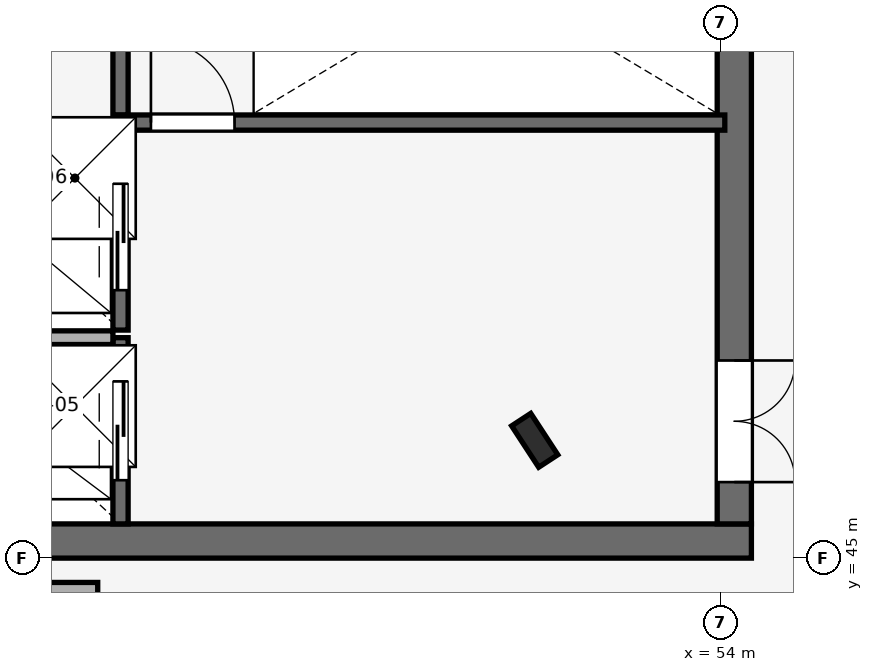
"""IFC4 building model, lengths in metres.
Left out: names, types, materials, properties, quantities, classifications, styles, units other than length and angle.
Written with IfcOpenShell. Run it as: python <this file> out.ifc"""

import sys

from ifc_helpers import new_model, si_unit, direction, frame, frame_2d, origin, origin_2d, place, context, subcontext, project, spatial, rectangle, i_section, extrude, element, fill, save


model = new_model("IFC4")
c1 = context("Model", 3, precision=1e-05, world=origin(), true_north=direction((0.0, 1.0)))
c2 = subcontext(c1, "Body", "Model", "MODEL_VIEW")
j1 = project(units=[si_unit("LENGTHUNIT", "METRE"), si_unit("PLANEANGLEUNIT", "RADIAN")], contexts=[c1])
p1 = place(None, origin())
s1 = spatial("IfcSite", under=j1, at=p1, CompositionType="ELEMENT")
p2 = place(p1, origin())
s2 = spatial("IfcBuilding", under=s1, at=p2, CompositionType="ELEMENT")
p3 = place(p2, frame((0.0, 0.0, 24.0)))
s3 = spatial("IfcBuildingStorey", under=s2, at=p3, CompositionType="ELEMENT", Elevation=24.0)
p4 = place(p3, frame((51.549, 46.55, 0.0), z_axis=(0.0, 0.0, 1.0), x_axis=(-0.836955398099, -0.547271104292, 0.0)))
e1 = element("IfcColumn", 1, at=p4, inside=s3, PredefinedType="COLUMN", context=c2, shape_type="SweptSolid", body=[
    extrude(i_section(OverallWidth=0.3, OverallDepth=0.65, WebThickness=0.016, FlangeThickness=0.031, FilletRadius=0.027, at=origin_2d()), origin(), (0.0, 0.0, 1.0), 3.4),
])
p5 = place(p3, frame((43.0, 45.225, 0.0), z_axis=(0.0, 0.0, 1.0), x_axis=(1.0, 0.0, 0.0)))
e2 = element("IfcWall", 2, at=p5, inside=s3, PredefinedType="SHEAR", context=c2, shape_type="SweptSolid", body=[
    extrude(rectangle(XDim=11.4, YDim=0.45, at=frame_2d((5.7, 0.0))), origin(), (0.0, 0.0, 1.0), 4.8),
])
p6 = place(p3, frame((54.175, 45.45, 0.0), z_axis=(0.0, 0.0, 1.0), x_axis=(0.0, 1.0, 0.0)))
e3 = element("IfcWall", 3, at=p6, inside=s3, PredefinedType="SHEAR", context=c2, shape_type="SweptSolid", body=[
    extrude(rectangle(XDim=9.1, YDim=0.45, at=frame_2d((4.55, 0.0))), origin(), (0.0, 0.0, 1.0), 4.8),
])
p7 = place(p6, frame((0.55, 0.0, 0.0)))
e4 = element("IfcOpeningElement", 4, at=p7, cuts=e3, PredefinedType="OPENING", context=c2, shape_type="SweptSolid", body=[
    extrude(rectangle(XDim=1.6, YDim=2.2, at=frame_2d((0.8, 1.1))), frame((0.0, 0.235, 0.0), z_axis=(0.0, -1.0, 0.0), x_axis=(1.0, 0.0, 0.0)), (0.0, 0.0, 1.0), 0.47),
])
p8 = place(p3, frame((45.8, 44.5, 0.0), z_axis=(0.0, 0.0, 1.0), x_axis=(-1.0, 0.0, 0.0)))
e5 = element("IfcWall", 5, at=p8, inside=s3, PredefinedType="STANDARD", context=c2, shape_type="SweptSolid", body=[
    extrude(rectangle(XDim=3.3, YDim=0.36, at=frame_2d((1.65, 0.0))), origin(), (0.0, 0.0, 1.0), 3.38),
])
p9 = place(p3, frame((46.1, 45.45, 0.0), z_axis=(0.0, 0.0, 1.0), x_axis=(0.0, 1.0, 0.0)))
e6 = element("IfcWall", 6, at=p9, inside=s3, PredefinedType="SHEAR", context=c2, shape_type="SweptSolid", body=[
    extrude(rectangle(XDim=2.45, YDim=0.2, at=frame_2d((1.225, 0.0))), origin(), (0.0, 0.0, 1.0), 3.38),
])
p10 = place(p9, frame((0.575, 0.0, 0.0)))
e7 = element("IfcOpeningElement", 7, at=p10, cuts=e6, PredefinedType="OPENING", context=c2, shape_type="SweptSolid", body=[
    extrude(rectangle(XDim=1.3, YDim=2.2, at=frame_2d((0.65, 1.1))), frame((0.0, 0.11, 0.0), z_axis=(0.0, -1.0, 0.0), x_axis=(1.0, 0.0, 0.0)), (0.0, 0.0, 1.0), 0.22),
])
p11 = place(p3, frame((43.55, 47.9, 0.0), z_axis=(0.0, 0.0, 1.0), x_axis=(1.0, 0.0, 0.0)))
e8 = element("IfcWall", 8, at=p11, inside=s3, PredefinedType="PARTITIONING", context=c2, shape_type="SweptSolid", body=[
    extrude(rectangle(XDim=2.45, YDim=0.18, at=frame_2d((1.225, 0.0))), origin(), (0.0, 0.0, 1.0), 4.8),
])
p12 = place(p3, frame((46.1, 48.0, 0.0), z_axis=(0.0, 0.0, 1.0), x_axis=(0.0, 1.0, 0.0)))
e9 = element("IfcWall", 9, at=p12, inside=s3, PredefinedType="SHEAR", context=c2, shape_type="SweptSolid", body=[
    extrude(rectangle(XDim=2.45, YDim=0.2, at=frame_2d((1.225, 0.0))), origin(), (0.0, 0.0, 1.0), 3.38),
])
p13 = place(p12, frame((0.525, 0.0, 0.0)))
e10 = element("IfcOpeningElement", 10, at=p13, cuts=e9, PredefinedType="OPENING", context=c2, shape_type="SweptSolid", body=[
    extrude(rectangle(XDim=1.4, YDim=2.2, at=frame_2d((0.7, 1.1))), frame((0.0, 0.11, 0.0), z_axis=(0.0, -1.0, 0.0), x_axis=(1.0, 0.0, 0.0)), (0.0, 0.0, 1.0), 0.22),
])
p14 = place(p3, frame((43.55, 50.45, 0.0), z_axis=(0.0, 0.0, 1.0), x_axis=(1.0, 0.0, 0.0)))
e11 = element("IfcWall", 11, at=p14, inside=s3, PredefinedType="PARTITIONING", context=c2, shape_type="SweptSolid", body=[
    extrude(rectangle(XDim=2.45, YDim=0.18, at=frame_2d((1.225, 0.0))), origin(), (0.0, 0.0, 1.0), 4.8),
])
p15 = place(p3, frame((46.1, 50.73, 0.0), z_axis=(0.0, 0.0, 1.0), x_axis=(1.0, 0.0, 0.0)))
e12 = element("IfcWall", 12, at=p15, inside=s3, PredefinedType="SHEAR", context=c2, shape_type="SweptSolid", body=[
    extrude(rectangle(XDim=7.95, YDim=0.2, at=frame_2d((3.975, 0.0))), origin(), (0.0, 0.0, 1.0), 4.8),
])
p16 = place(p15, frame((0.4, 0.0, 0.0)))
e13 = element("IfcOpeningElement", 13, at=p16, cuts=e12, PredefinedType="OPENING", context=c2, shape_type="SweptSolid", body=[
    extrude(rectangle(XDim=1.1, YDim=2.15, at=frame_2d((0.55, 1.075))), frame((0.0, 0.11, 0.0), z_axis=(0.0, -1.0, 0.0), x_axis=(1.0, 0.0, 0.0)), (0.0, 0.0, 1.0), 0.22),
])
p17 = place(p3, frame((46.1, 50.832, 0.0), z_axis=(0.0, 0.0, 1.0), x_axis=(0.0, 1.0, 0.0)))
e14 = element("IfcWall", 14, at=p17, inside=s3, PredefinedType="SHEAR", context=c2, shape_type="SweptSolid", body=[
    extrude(rectangle(XDim=3.686, YDim=0.2, at=frame_2d((1.843, 0.0))), origin(), (0.0, 0.0, 1.0), 4.8),
])
p18 = place(p2, frame((0.0, 0.0, 28.8)))
p19 = place(p18, frame((45.559, 50.446, 0.0)))
p20 = place(p19, frame((-0.059, -3.446, -0.01)))
p21 = place(p20, frame((0.0, 0.0, 0.14)))
e15 = element("IfcWindow", 15, at=p21, inside=s3, PartitioningType="SINGLE_PANEL", PredefinedType="SKYLIGHT", context=c2, shape_type="SweptSolid", body=[
    extrude(rectangle(XDim=1.6, YDim=1.6, at=origin_2d()), origin(), (0.0, 0.0, 1.0), 0.05),
])
p22 = place(p19, frame((-0.059, -0.446, -0.01)))
p23 = place(p22, frame((0.0, 0.0, 0.14)))
e16 = element("IfcWindow", 16, at=p23, inside=s3, PartitioningType="SINGLE_PANEL", PredefinedType="SKYLIGHT", context=c2, shape_type="SweptSolid", body=[
    extrude(rectangle(XDim=1.6, YDim=1.6, at=origin_2d()), origin(), (0.0, 0.0, 1.0), 0.05),
])
p24 = place(p10, origin())
e17 = element("IfcDoor", 17, at=p24, inside=s3, OperationType="DOUBLE_DOOR_SLIDING", PredefinedType="DOOR", context=c2, shape_type="SweptSolid", body=[
    extrude(rectangle(XDim=1.3, YDim=2.2, at=frame_2d((0.65, 1.1))), frame((0.0, 0.025, 0.0), z_axis=(0.0, -1.0, 0.0), x_axis=(1.0, 0.0, 0.0)), (0.0, 0.0, 1.0), 0.05),
])
fill(e7, e17)
p25 = place(p13, origin())
e18 = element("IfcDoor", 18, at=p25, inside=s3, OperationType="DOUBLE_DOOR_SLIDING", PredefinedType="DOOR", context=c2, shape_type="SweptSolid", body=[
    extrude(rectangle(XDim=1.4, YDim=2.2, at=frame_2d((0.7, 1.1))), frame((0.0, 0.025, 0.0), z_axis=(0.0, -1.0, 0.0), x_axis=(1.0, 0.0, 0.0)), (0.0, 0.0, 1.0), 0.05),
])
fill(e10, e18)
p26 = place(p16, frame((1.1, 0.0, 0.0), z_axis=(0.0, 0.0, 1.0), x_axis=(-1.0, 0.0, 0.0)))
e19 = element("IfcDoor", 19, at=p26, inside=s3, OperationType="SINGLE_SWING_RIGHT", PredefinedType="DOOR", context=c2, shape_type="SweptSolid", body=[
    extrude(rectangle(XDim=1.1, YDim=2.15, at=frame_2d((0.55, 1.075))), frame((0.0, 0.025, 0.0), z_axis=(0.0, -1.0, 0.0), x_axis=(1.0, 0.0, 0.0)), (0.0, 0.0, 1.0), 0.05),
])
fill(e13, e19)
p27 = place(p7, frame((1.6, 0.0, 0.0), z_axis=(0.0, 0.0, 1.0), x_axis=(-1.0, 0.0, 0.0)))
e20 = element("IfcDoor", 20, at=p27, inside=s3, OperationType="DOUBLE_DOOR_SINGLE_SWING", PredefinedType="DOOR", context=c2, shape_type="SweptSolid", body=[
    extrude(rectangle(XDim=1.6, YDim=2.2, at=frame_2d((0.8, 1.1))), frame((0.0, 0.025, 0.0), z_axis=(0.0, -1.0, 0.0), x_axis=(1.0, 0.0, 0.0)), (0.0, 0.0, 1.0), 0.05),
])
fill(e4, e20)
save(model, sys.argv[1])
